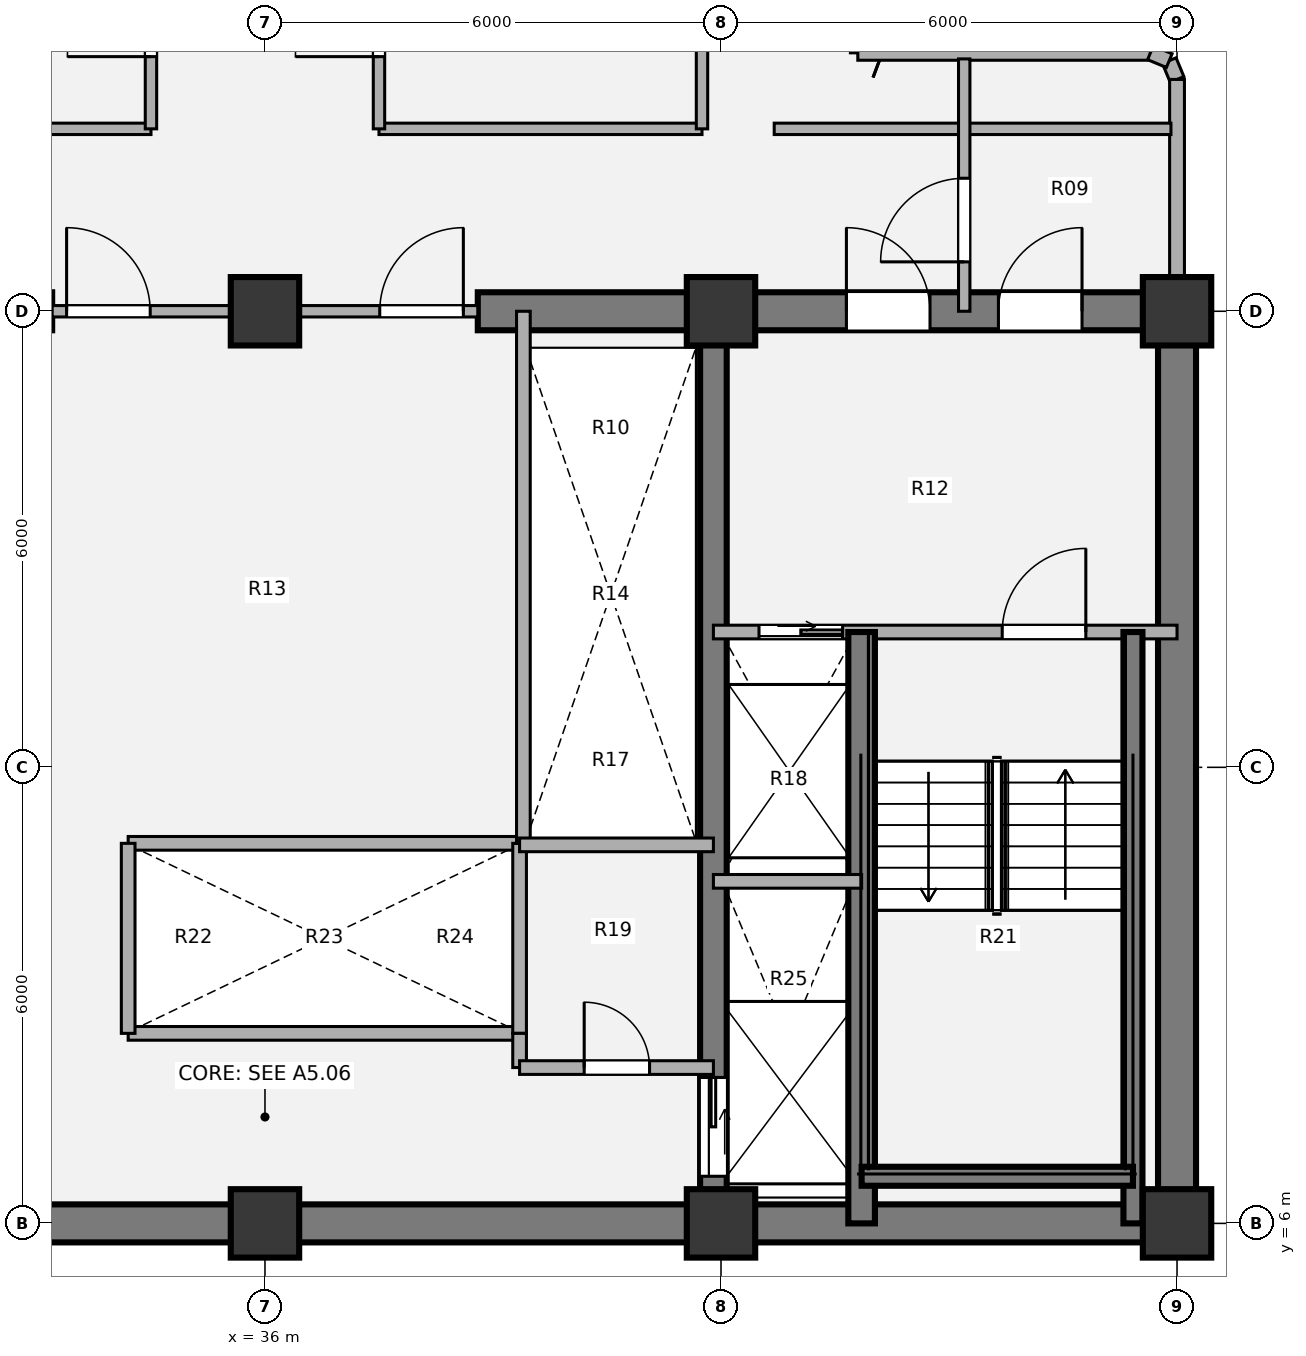
"""IFC4 building model, lengths in metres.
Left out: names, types, materials, properties, quantities, classifications, styles, units other than length and angle.
Written with IfcOpenShell. Run it as: python <this file> out.ifc"""

import sys

from ifc_helpers import new_model, si_unit, direction, frame, frame_2d, origin, origin_2d, place, context, subcontext, project, spatial, rectangle, extrude, source, transform, mapped, element, fill, save


model = new_model("IFC4")
c1 = context("Model", 3, precision=1e-05, world=origin(), true_north=direction((0.0, 1.0)))
c2 = subcontext(c1, "Body", "Model", "MODEL_VIEW")
j1 = project(units=[si_unit("LENGTHUNIT", "METRE"), si_unit("PLANEANGLEUNIT", "RADIAN")], contexts=[c1])
p1 = place(None, origin())
s1 = spatial("IfcSite", under=j1, at=p1, CompositionType="ELEMENT")
p2 = place(p1, origin())
s2 = spatial("IfcBuilding", under=s1, at=p2, CompositionType="ELEMENT")
p3 = place(p2, frame((0.0, 0.0, 146.52)))
s3 = spatial("IfcBuildingStorey", under=s2, at=p3, CompositionType="ELEMENT", Elevation=146.52)
m1 = source(origin(), c2, "Body", "SweptSolid", [
    extrude(rectangle(XDim=0.9, YDim=0.9, at=origin_2d()), origin(), (0.0, 0.0, 1.0), 5.4),
])
for number, where, z_axis, x_axis in (
    (1, (36.0, 6.0, 0.0), (0.0, 0.0, 1.0), (1.0, 0.0, 0.0)),
    (2, (42.0, 6.0, 0.0), (0.0, 0.0, 1.0), (1.0, 0.0, 0.0)),
    (3, (48.0, 6.0, 0.0), (0.0, 0.0, 1.0), (1.0, 0.0, 0.0)),
    (4, (36.0, 18.0, 0.0), (0.0, 0.0, 1.0), (1.0, 0.0, 0.0)),
    (5, (42.0, 18.0, 0.0), (0.0, 0.0, 1.0), (1.0, 0.0, 0.0)),
    (6, (48.0, 18.0, 0.0), (0.0, 0.0, 1.0), (1.0, 0.0, 0.0)),
):
    element("IfcColumn", number, at=place(p3, frame(where, z_axis=z_axis, x_axis=x_axis)), inside=s3, PredefinedType="COLUMN", context=c2, shape_type="MappedRepresentation", body=[
        mapped(m1, transform((0.0, 0.0, 0.0), x_axis=(1.0, 0.0, 0.0), y_axis=(0.0, 1.0, 0.0), z_axis=(0.0, 0.0, 1.0), scale=1.0)),
    ])
p4 = place(p3, frame((48.25, 6.0, 0.0), z_axis=(0.0, 0.0, 1.0), x_axis=(-1.0, 0.0, 0.0)))
e7 = element("IfcWall", 7, at=p4, inside=s3, PredefinedType="SHEAR", context=c2, shape_type="SweptSolid", body=[
    extrude(rectangle(XDim=24.5, YDim=0.5, at=frame_2d((12.25, 0.0))), origin(), (0.0, 0.0, 1.0), 5.4),
])
p5 = place(p3, frame((48.0, 18.0, 0.0), z_axis=(0.0, 0.0, 1.0), x_axis=(0.0, -1.0, 0.0)))
e8 = element("IfcWall", 8, at=p5, inside=s3, PredefinedType="SHEAR", context=c2, shape_type="SweptSolid", body=[
    extrude(rectangle(XDim=12.0, YDim=0.5, at=frame_2d((6.0, 0.0))), origin(), (0.0, 0.0, 1.0), 5.4),
])
p6 = place(p3, frame((23.75, 18.0, 0.0), z_axis=(0.0, 0.0, 1.0), x_axis=(1.0, 0.0, 0.0)))
e9 = element("IfcWall", 9, at=p6, inside=s3, PredefinedType="SHEAR", context=c2, shape_type="SweptSolid", body=[
    extrude(rectangle(XDim=9.45, YDim=0.5, at=frame_2d((4.725, 0.0))), origin(), (0.0, 0.0, 1.0), 5.4),
])
p7 = place(p6, frame((1.5, 0.0, 0.0)))
e10 = element("IfcOpeningElement", 10, at=p7, cuts=e9, PredefinedType="OPENING", context=c2, shape_type="SweptSolid", body=[
    extrude(rectangle(XDim=1.1, YDim=2.1, at=origin_2d()), frame((0.55, 0.26, 1.05), z_axis=(0.0, -1.0, 0.0), x_axis=(1.0, 0.0, 0.0)), (0.0, 0.0, 1.0), 0.52),
])
p8 = place(p6, frame((3.5, 0.0, 0.0)))
e11 = element("IfcOpeningElement", 11, at=p8, cuts=e9, PredefinedType="OPENING", context=c2, shape_type="SweptSolid", body=[
    extrude(rectangle(XDim=1.1, YDim=2.1, at=origin_2d()), frame((0.55, 0.26, 1.05), z_axis=(0.0, -1.0, 0.0), x_axis=(1.0, 0.0, 0.0)), (0.0, 0.0, 1.0), 0.52),
])
p9 = place(p3, frame((38.8, 18.0, 0.0), z_axis=(0.0, 0.0, 1.0), x_axis=(1.0, 0.0, 0.0)))
e12 = element("IfcWall", 12, at=p9, inside=s3, PredefinedType="SHEAR", context=c2, shape_type="SweptSolid", body=[
    extrude(rectangle(XDim=9.45, YDim=0.5, at=frame_2d((4.725, 0.0))), origin(), (0.0, 0.0, 1.0), 5.4),
])
p10 = place(p9, frame((4.85, 0.0, 0.0)))
e13 = element("IfcOpeningElement", 13, at=p10, cuts=e12, PredefinedType="OPENING", context=c2, shape_type="SweptSolid", body=[
    extrude(rectangle(XDim=1.1, YDim=2.1, at=origin_2d()), frame((0.55, 0.26, 1.05), z_axis=(0.0, -1.0, 0.0), x_axis=(1.0, 0.0, 0.0)), (0.0, 0.0, 1.0), 0.52),
])
p11 = place(p9, frame((6.85, 0.0, 0.0)))
e14 = element("IfcOpeningElement", 14, at=p11, cuts=e12, PredefinedType="OPENING", context=c2, shape_type="SweptSolid", body=[
    extrude(rectangle(XDim=1.1, YDim=2.1, at=origin_2d()), frame((0.55, 0.26, 1.05), z_axis=(0.0, -1.0, 0.0), x_axis=(1.0, 0.0, 0.0)), (0.0, 0.0, 1.0), 0.52),
])
p12 = place(p3, frame((41.9, 18.0, 0.0), z_axis=(0.0, 0.0, 1.0), x_axis=(0.0, -1.0, 0.0)))
e15 = element("IfcWall", 15, at=p12, inside=s3, PredefinedType="SHEAR", context=c2, shape_type="SweptSolid", body=[
    extrude(rectangle(XDim=12.0, YDim=0.35, at=frame_2d((6.0, 0.0))), origin(), (0.0, 0.0, 1.0), 5.4),
])
p13 = place(p12, frame((10.08, 0.0, 0.0)))
e16 = element("IfcOpeningElement", 16, at=p13, cuts=e15, PredefinedType="OPENING", context=c2, shape_type="SweptSolid", body=[
    extrude(rectangle(XDim=1.3, YDim=2.1, at=origin_2d()), frame((0.65, 0.185, 1.05), z_axis=(0.0, -1.0, 0.0), x_axis=(1.0, 0.0, 0.0)), (0.0, 0.0, 1.0), 0.37),
])
p14 = place(p3, frame((47.897, 21.298, 0.0), z_axis=(0.0, 0.0, 1.0), x_axis=(0.382673670509, -0.923883575944, 0.0)))
e17 = element("IfcWall", 17, at=p14, inside=s3, PredefinedType="SOLIDWALL", context=c2, shape_type="SweptSolid", body=[
    extrude(rectangle(XDim=0.268, YDim=0.195, at=frame_2d((0.134, 0.0))), origin(), (0.0, 0.0, 1.0), 5.08),
])
p15 = place(p3, frame((48.0, 21.05, 0.0), z_axis=(0.0, 0.0, 1.0), x_axis=(0.0, -1.0, 0.0)))
e18 = element("IfcWall", 18, at=p15, inside=s3, PredefinedType="SOLIDWALL", context=c2, shape_type="SweptSolid", body=[
    extrude(rectangle(XDim=2.62, YDim=0.195, at=frame_2d((1.31, 0.0))), origin(), (0.0, 0.0, 1.0), 5.08),
])
p16 = place(p3, frame((43.8, 21.4, 0.0), z_axis=(0.0, 0.0, 1.0), x_axis=(1.0, 0.0, 0.0)))
e19 = element("IfcWall", 19, at=p16, inside=s3, PredefinedType="SOLIDWALL", context=c2, shape_type="SweptSolid", body=[
    extrude(rectangle(XDim=3.85, YDim=0.195, at=frame_2d((1.925, 0.0))), origin(), (0.0, 0.0, 1.0), 5.08),
])
p17 = place(p3, frame((47.65, 21.4, 0.0), z_axis=(0.0, 0.0, 1.0), x_axis=(0.924205486139, -0.381895560841, 0.0)))
e20 = element("IfcWall", 20, at=p17, inside=s3, PredefinedType="SOLIDWALL", context=c2, shape_type="SweptSolid", body=[
    extrude(rectangle(XDim=0.268, YDim=0.195, at=frame_2d((0.134, 0.0))), origin(), (0.0, 0.0, 1.0), 5.08),
])
for number, where, z_axis, x_axis in (
    (21, (34.2, 11.0, 0.0), (0.0, 0.0, 1.0), (1.0, 0.0, 0.0)),
    (22, (34.2, 8.5, 0.0), (0.0, 0.0, 1.0), (1.0, 0.0, 0.0)),
):
    element("IfcWall", number, at=place(p3, frame(where, z_axis=z_axis, x_axis=x_axis)), inside=s3, PredefinedType="PARTITIONING", context=c2, shape_type="SweptSolid", body=[
        extrude(rectangle(XDim=5.15, YDim=0.18, at=frame_2d((2.575, 0.0))), origin(), (0.0, 0.0, 1.0), 5.05),
    ])
for number, where, z_axis, x_axis in (
    (23, (34.2, 8.5, 0.0), (0.0, 0.0, 1.0), (0.0, 1.0, 0.0)),
    (24, (39.35, 8.5, 0.0), (0.0, 0.0, 1.0), (0.0, 1.0, 0.0)),
):
    element("IfcWall", number, at=place(p3, frame(where, z_axis=z_axis, x_axis=x_axis)), inside=s3, PredefinedType="PARTITIONING", context=c2, shape_type="SweptSolid", body=[
        extrude(rectangle(XDim=2.5, YDim=0.18, at=frame_2d((1.25, 0.0))), origin(), (0.0, 0.0, 1.0), 5.05),
    ])
p18 = place(p3, frame((39.4, 11.0, 0.0), z_axis=(0.0, 0.0, 1.0), x_axis=(0.0, 1.0, 0.0)))
e25 = element("IfcWall", 25, at=p18, inside=s3, PredefinedType="PARTITIONING", context=c2, shape_type="SweptSolid", body=[
    extrude(rectangle(XDim=7.0, YDim=0.18, at=frame_2d((3.5, 0.0))), origin(), (0.0, 0.0, 1.0), 5.05),
])
p19 = place(p3, frame((39.35, 10.98, 0.0), z_axis=(0.0, 0.0, 1.0), x_axis=(1.0, 0.0, 0.0)))
e26 = element("IfcWall", 26, at=p19, inside=s3, PredefinedType="PARTITIONING", context=c2, shape_type="SweptSolid", body=[
    extrude(rectangle(XDim=2.55, YDim=0.18, at=frame_2d((1.275, 0.0))), origin(), (0.0, 0.0, 1.0), 5.05),
])
p20 = place(p3, frame((39.35, 8.05, 0.0), z_axis=(0.0, 0.0, 1.0), x_axis=(0.0, 1.0, 0.0)))
e27 = element("IfcWall", 27, at=p20, inside=s3, PredefinedType="PARTITIONING", context=c2, shape_type="SweptSolid", body=[
    extrude(rectangle(XDim=0.45, YDim=0.18, at=frame_2d((0.225, 0.0))), origin(), (0.0, 0.0, 1.0), 5.05),
])
p21 = place(p3, frame((39.35, 8.05, 0.0), z_axis=(0.0, 0.0, 1.0), x_axis=(1.0, 0.0, 0.0)))
e28 = element("IfcWall", 28, at=p21, inside=s3, PredefinedType="PARTITIONING", context=c2, shape_type="SweptSolid", body=[
    extrude(rectangle(XDim=2.55, YDim=0.18, at=frame_2d((1.275, 0.0))), origin(), (0.0, 0.0, 1.0), 5.05),
])
p22 = place(p21, frame((0.85, 0.0, 0.0)))
e29 = element("IfcOpeningElement", 29, at=p22, cuts=e28, PredefinedType="OPENING", context=c2, shape_type="SweptSolid", body=[
    extrude(rectangle(XDim=0.86, YDim=2.1, at=origin_2d()), frame((0.43, 0.1, 1.05), z_axis=(0.0, -1.0, 0.0), x_axis=(1.0, 0.0, 0.0)), (0.0, 0.0, 1.0), 0.2),
])
p23 = place(p3, frame((33.2, 18.0, 0.0), z_axis=(0.0, 0.0, 1.0), x_axis=(1.0, 0.0, 0.0)))
e30 = element("IfcWall", 30, at=p23, inside=s3, PredefinedType="PARTITIONING", context=c2, shape_type="SweptSolid", body=[
    extrude(rectangle(XDim=5.6, YDim=0.15, at=frame_2d((2.8, 0.0))), origin(), (0.0, 0.0, 1.0), 3.865),
])
p24 = place(p23, frame((0.19, 0.0, 0.0)))
e31 = element("IfcOpeningElement", 31, at=p24, cuts=e30, PredefinedType="OPENING", context=c2, shape_type="SweptSolid", body=[
    extrude(rectangle(XDim=1.1, YDim=2.1, at=origin_2d()), frame((0.55, 0.085, 1.05), z_axis=(0.0, -1.0, 0.0), x_axis=(1.0, 0.0, 0.0)), (0.0, 0.0, 1.0), 0.17),
])
p25 = place(p23, frame((4.31, 0.0, 0.0)))
e32 = element("IfcOpeningElement", 32, at=p25, cuts=e30, PredefinedType="OPENING", context=c2, shape_type="SweptSolid", body=[
    extrude(rectangle(XDim=1.1, YDim=2.1, at=origin_2d()), frame((0.55, 0.085, 1.05), z_axis=(0.0, -1.0, 0.0), x_axis=(1.0, 0.0, 0.0)), (0.0, 0.0, 1.0), 0.17),
])
p26 = place(p3, frame((41.9, 13.78, 0.0), z_axis=(0.0, 0.0, 1.0), x_axis=(1.0, 0.0, 0.0)))
e33 = element("IfcWall", 33, at=p26, inside=s3, PredefinedType="PARTITIONING", context=c2, shape_type="SweptSolid", body=[
    extrude(rectangle(XDim=6.1, YDim=0.18, at=frame_2d((3.05, 0.0))), origin(), (0.0, 0.0, 1.0), 2.229),
])
p27 = place(p26, frame((0.6, 0.0, 0.0)))
e34 = element("IfcOpeningElement", 34, at=p27, cuts=e33, PredefinedType="OPENING", context=c2, shape_type="SweptSolid", body=[
    extrude(rectangle(XDim=1.1, YDim=2.1, at=origin_2d()), frame((0.55, 0.1, 1.05), z_axis=(0.0, -1.0, 0.0), x_axis=(1.0, 0.0, 0.0)), (0.0, 0.0, 1.0), 0.2),
])
p28 = place(p26, frame((3.8, 0.0, 0.0)))
e35 = element("IfcOpeningElement", 35, at=p28, cuts=e33, PredefinedType="OPENING", context=c2, shape_type="SweptSolid", body=[
    extrude(rectangle(XDim=1.1, YDim=2.1, at=origin_2d()), frame((0.55, 0.1, 1.05), z_axis=(0.0, -1.0, 0.0), x_axis=(1.0, 0.0, 0.0)), (0.0, 0.0, 1.0), 0.2),
])
p29 = place(p3, frame((43.85, 6.0, 0.0), z_axis=(0.0, 0.0, 1.0), x_axis=(0.0, 1.0, 0.0)))
e36 = element("IfcWall", 36, at=p29, inside=s3, PredefinedType="SHEAR", context=c2, shape_type="SweptSolid", body=[
    extrude(rectangle(XDim=7.78, YDim=0.35, at=frame_2d((3.89, 0.0))), origin(), (0.0, 0.0, 1.0), 5.4),
])
p30 = place(p3, frame((47.42, 6.0, 0.0), z_axis=(0.0, 0.0, 1.0), x_axis=(0.0, 1.0, 0.0)))
e37 = element("IfcWall", 37, at=p30, inside=s3, PredefinedType="SHEAR", context=c2, shape_type="SweptSolid", body=[
    extrude(rectangle(XDim=7.78, YDim=0.25, at=frame_2d((3.89, 0.0))), origin(), (0.0, 0.0, 1.0), 5.4),
])
p31 = place(p3, frame((43.85, 6.62, 0.0), z_axis=(0.0, 0.0, 1.0), x_axis=(1.0, 0.0, 0.0)))
e38 = element("IfcWall", 38, at=p31, inside=s3, PredefinedType="SHEAR", context=c2, shape_type="SweptSolid", body=[
    extrude(rectangle(XDim=3.57, YDim=0.25, at=frame_2d((1.785, 0.0))), origin(), (0.0, 0.0, 1.0), 5.4),
])
p32 = place(p3, frame((41.9, 10.5, 0.0), z_axis=(0.0, 0.0, 1.0), x_axis=(1.0, 0.0, 0.0)))
e39 = element("IfcWall", 39, at=p32, inside=s3, PredefinedType="PARTITIONING", context=c2, shape_type="SweptSolid", body=[
    extrude(rectangle(XDim=1.95, YDim=0.18, at=frame_2d((0.975, 0.0))), origin(), (0.0, 0.0, 1.0), 5.05),
])
for number, where, z_axis, x_axis in (
    (40, (30.25, 20.4, 0.0), (0.0, 0.0, 1.0), (1.0, 0.0, 0.0)),
    (41, (37.5, 20.4, 0.0), (0.0, 0.0, 1.0), (1.0, 0.0, 0.0)),
):
    element("IfcWall", number, at=place(p3, frame(where, z_axis=z_axis, x_axis=x_axis)), inside=s3, PredefinedType="PARTITIONING", context=c2, shape_type="SweptSolid", body=[
        extrude(rectangle(XDim=4.25, YDim=0.15, at=frame_2d((2.125, 0.0))), origin(), (0.0, 0.0, 1.0), 5.05),
    ])
p33 = place(p3, frame((42.7, 20.4, 0.0), z_axis=(0.0, 0.0, 1.0), x_axis=(1.0, 0.0, 0.0)))
e42 = element("IfcWall", 42, at=p33, inside=s3, PredefinedType="PARTITIONING", context=c2, shape_type="SweptSolid", body=[
    extrude(rectangle(XDim=5.22, YDim=0.15, at=frame_2d((2.61, 0.0))), origin(), (0.0, 0.0, 1.0), 5.05),
])
p34 = place(p3, frame((34.5, 20.4, 0.0), z_axis=(0.0, 0.0, 1.0), x_axis=(0.0, 1.0, 0.0)))
e43 = element("IfcWall", 43, at=p34, inside=s3, PredefinedType="PARTITIONING", context=c2, shape_type="SweptSolid", body=[
    extrude(rectangle(XDim=11.8, YDim=0.15, at=frame_2d((5.9, 0.0))), origin(), (0.0, 0.0, 1.0), 5.05),
])
p35 = place(p34, frame((0.95, 0.0, 0.0)))
e44 = element("IfcOpeningElement", 44, at=p35, cuts=e43, PredefinedType="OPENING", context=c2, shape_type="SweptSolid", body=[
    extrude(rectangle(XDim=1.1, YDim=2.1, at=origin_2d()), frame((0.55, 0.085, 1.05), z_axis=(0.0, -1.0, 0.0), x_axis=(1.0, 0.0, 0.0)), (0.0, 0.0, 1.0), 0.17),
])
p36 = place(p3, frame((37.5, 20.4, 0.0), z_axis=(0.0, 0.0, 1.0), x_axis=(0.0, 1.0, 0.0)))
e45 = element("IfcWall", 45, at=p36, inside=s3, PredefinedType="PARTITIONING", context=c2, shape_type="SweptSolid", body=[
    extrude(rectangle(XDim=11.8, YDim=0.15, at=frame_2d((5.9, 0.0))), origin(), (0.0, 0.0, 1.0), 5.05),
])
p37 = place(p36, frame((0.95, 0.0, 0.0)))
e46 = element("IfcOpeningElement", 46, at=p37, cuts=e45, PredefinedType="OPENING", context=c2, shape_type="SweptSolid", body=[
    extrude(rectangle(XDim=1.1, YDim=2.1, at=origin_2d()), frame((0.55, 0.085, 1.05), z_axis=(0.0, -1.0, 0.0), x_axis=(1.0, 0.0, 0.0)), (0.0, 0.0, 1.0), 0.17),
])
p38 = place(p3, frame((41.75, 20.4, 0.0), z_axis=(0.0, 0.0, 1.0), x_axis=(0.0, 1.0, 0.0)))
e47 = element("IfcWall", 47, at=p38, inside=s3, PredefinedType="PARTITIONING", context=c2, shape_type="SweptSolid", body=[
    extrude(rectangle(XDim=11.8, YDim=0.15, at=frame_2d((5.9, 0.0))), origin(), (0.0, 0.0, 1.0), 3.265),
])
p39 = place(p3, frame((45.2, 18.0, 0.0), z_axis=(0.0, 0.0, 1.0), x_axis=(0.0, 1.0, 0.0)))
e48 = element("IfcWall", 48, at=p39, inside=s3, PredefinedType="PARTITIONING", context=c2, shape_type="SweptSolid", body=[
    extrude(rectangle(XDim=3.32, YDim=0.15, at=frame_2d((1.66, 0.0))), origin(), (0.0, 0.0, 1.0), 5.05),
])
p40 = place(p39, frame((0.65, 0.0, 0.0)))
e49 = element("IfcOpeningElement", 49, at=p40, cuts=e48, PredefinedType="OPENING", context=c2, shape_type="SweptSolid", body=[
    extrude(rectangle(XDim=1.1, YDim=2.1, at=origin_2d()), frame((0.55, 0.085, 1.05), z_axis=(0.0, -1.0, 0.0), x_axis=(1.0, 0.0, 0.0)), (0.0, 0.0, 1.0), 0.17),
])
m2 = source(origin(), c2, "Body", "SweptSolid", [
    extrude(rectangle(XDim=0.86, YDim=2.1, at=origin_2d()), frame((0.43, 0.025, 1.05), z_axis=(0.0, -1.0, 0.0), x_axis=(1.0, 0.0, 0.0)), (0.0, 0.0, 1.0), 0.05),
])
p41 = place(p22, origin())
e50 = element("IfcDoor", 50, at=p41, inside=s3, OperationType="SINGLE_SWING_LEFT", PredefinedType="DOOR", context=c2, shape_type="MappedRepresentation", body=[
    mapped(m2, transform((0.0, 0.0, 0.0), x_axis=(1.0, 0.0, 0.0), y_axis=(0.0, 1.0, 0.0), z_axis=(0.0, 0.0, 1.0), scale=1.0)),
])
fill(e29, e50)
m3 = source(origin(), c2, "Body", "SweptSolid", [
    extrude(rectangle(XDim=1.1, YDim=2.1, at=origin_2d()), frame((0.55, 0.025, 1.05), z_axis=(0.0, -1.0, 0.0), x_axis=(1.0, 0.0, 0.0)), (0.0, 0.0, 1.0), 0.05),
])
p42 = place(p24, origin())
e51 = element("IfcDoor", 51, at=p42, inside=s3, OperationType="SINGLE_SWING_LEFT", PredefinedType="DOOR", context=c2, shape_type="MappedRepresentation", body=[
    mapped(m3, transform((0.0, 0.0, 0.0), x_axis=(1.0, 0.0, 0.0), y_axis=(0.0, 1.0, 0.0), z_axis=(0.0, 0.0, 1.0), scale=1.0)),
])
fill(e31, e51)
p43 = place(p25, origin())
e52 = element("IfcDoor", 52, at=p43, inside=s3, OperationType="SINGLE_SWING_RIGHT", PredefinedType="DOOR", context=c2, shape_type="MappedRepresentation", body=[
    mapped(m3, transform((0.0, 0.0, 0.0), x_axis=(1.0, 0.0, 0.0), y_axis=(0.0, 1.0, 0.0), z_axis=(0.0, 0.0, 1.0), scale=1.0)),
])
fill(e32, e52)
m4 = source(origin(), c2, "Body", "SweptSolid", [
    extrude(rectangle(XDim=1.1, YDim=2.1, at=origin_2d()), frame((0.55, 0.025, 1.05), z_axis=(0.0, -1.0, 0.0), x_axis=(1.0, 0.0, 0.0)), (0.0, 0.0, 1.0), 0.05),
])
p44 = place(p27, origin())
e53 = element("IfcDoor", 53, at=p44, inside=s3, OperationType="SLIDING_TO_RIGHT", PredefinedType="DOOR", context=c2, shape_type="MappedRepresentation", body=[
    mapped(m4, transform((0.0, 0.0, 0.0), x_axis=(1.0, 0.0, 0.0), y_axis=(0.0, 1.0, 0.0), z_axis=(0.0, 0.0, 1.0), scale=1.0)),
])
fill(e34, e53)
m5 = source(origin(), c2, "Body", "SweptSolid", [
    extrude(rectangle(XDim=1.1, YDim=2.1, at=origin_2d()), frame((0.55, 0.025, 1.05), z_axis=(0.0, -1.0, 0.0), x_axis=(1.0, 0.0, 0.0)), (0.0, 0.0, 1.0), 0.05),
])
p45 = place(p28, origin())
e54 = element("IfcDoor", 54, at=p45, inside=s3, OperationType="SINGLE_SWING_RIGHT", PredefinedType="DOOR", context=c2, shape_type="MappedRepresentation", body=[
    mapped(m5, transform((0.0, 0.0, 0.0), x_axis=(1.0, 0.0, 0.0), y_axis=(0.0, 1.0, 0.0), z_axis=(0.0, 0.0, 1.0), scale=1.0)),
])
fill(e35, e54)
m6 = source(origin(), c2, "Body", "SweptSolid", [
    extrude(rectangle(XDim=1.3, YDim=2.1, at=origin_2d()), frame((0.65, 0.025, 1.05), z_axis=(0.0, -1.0, 0.0), x_axis=(1.0, 0.0, 0.0)), (0.0, 0.0, 1.0), 0.05),
])
p46 = place(p13, origin())
e55 = element("IfcDoor", 55, at=p46, inside=s3, OperationType="SLIDING_TO_LEFT", PredefinedType="DOOR", context=c2, shape_type="MappedRepresentation", body=[
    mapped(m6, transform((0.0, 0.0, 0.0), x_axis=(1.0, 0.0, 0.0), y_axis=(0.0, 1.0, 0.0), z_axis=(0.0, 0.0, 1.0), scale=1.0)),
])
fill(e16, e55)
p47 = place(p10, origin())
e56 = element("IfcDoor", 56, at=p47, inside=s3, OperationType="SINGLE_SWING_LEFT", PredefinedType="DOOR", context=c2, shape_type="MappedRepresentation", body=[
    mapped(m3, transform((0.0, 0.0, 0.0), x_axis=(1.0, 0.0, 0.0), y_axis=(0.0, 1.0, 0.0), z_axis=(0.0, 0.0, 1.0), scale=1.0)),
])
fill(e13, e56)
p48 = place(p11, origin())
e57 = element("IfcDoor", 57, at=p48, inside=s3, OperationType="SINGLE_SWING_RIGHT", PredefinedType="DOOR", context=c2, shape_type="MappedRepresentation", body=[
    mapped(m3, transform((0.0, 0.0, 0.0), x_axis=(1.0, 0.0, 0.0), y_axis=(0.0, 1.0, 0.0), z_axis=(0.0, 0.0, 1.0), scale=1.0)),
])
fill(e14, e57)
m7 = source(origin(), c2, "Body", "SweptSolid", [
    extrude(rectangle(XDim=1.1, YDim=2.1, at=origin_2d()), frame((0.55, 0.025, 1.05), z_axis=(0.0, -1.0, 0.0), x_axis=(1.0, 0.0, 0.0)), (0.0, 0.0, 1.0), 0.05),
])
p49 = place(p35, origin())
e58 = element("IfcDoor", 58, at=p49, inside=s3, OperationType="SINGLE_SWING_LEFT", PredefinedType="DOOR", context=c2, shape_type="MappedRepresentation", body=[
    mapped(m7, transform((0.0, 0.0, 0.0), x_axis=(1.0, 0.0, 0.0), y_axis=(0.0, 1.0, 0.0), z_axis=(0.0, 0.0, 1.0), scale=1.0)),
])
fill(e44, e58)
p50 = place(p37, origin())
e59 = element("IfcDoor", 59, at=p50, inside=s3, OperationType="SINGLE_SWING_LEFT", PredefinedType="DOOR", context=c2, shape_type="MappedRepresentation", body=[
    mapped(m7, transform((0.0, 0.0, 0.0), x_axis=(1.0, 0.0, 0.0), y_axis=(0.0, 1.0, 0.0), z_axis=(0.0, 0.0, 1.0), scale=1.0)),
])
fill(e46, e59)
p51 = place(p40, origin())
e60 = element("IfcDoor", 60, at=p51, inside=s3, OperationType="SINGLE_SWING_LEFT", PredefinedType="DOOR", context=c2, shape_type="MappedRepresentation", body=[
    mapped(m7, transform((0.0, 0.0, 0.0), x_axis=(1.0, 0.0, 0.0), y_axis=(0.0, 1.0, 0.0), z_axis=(0.0, 0.0, 1.0), scale=1.0)),
])
fill(e49, e60)
save(model, sys.argv[1])
